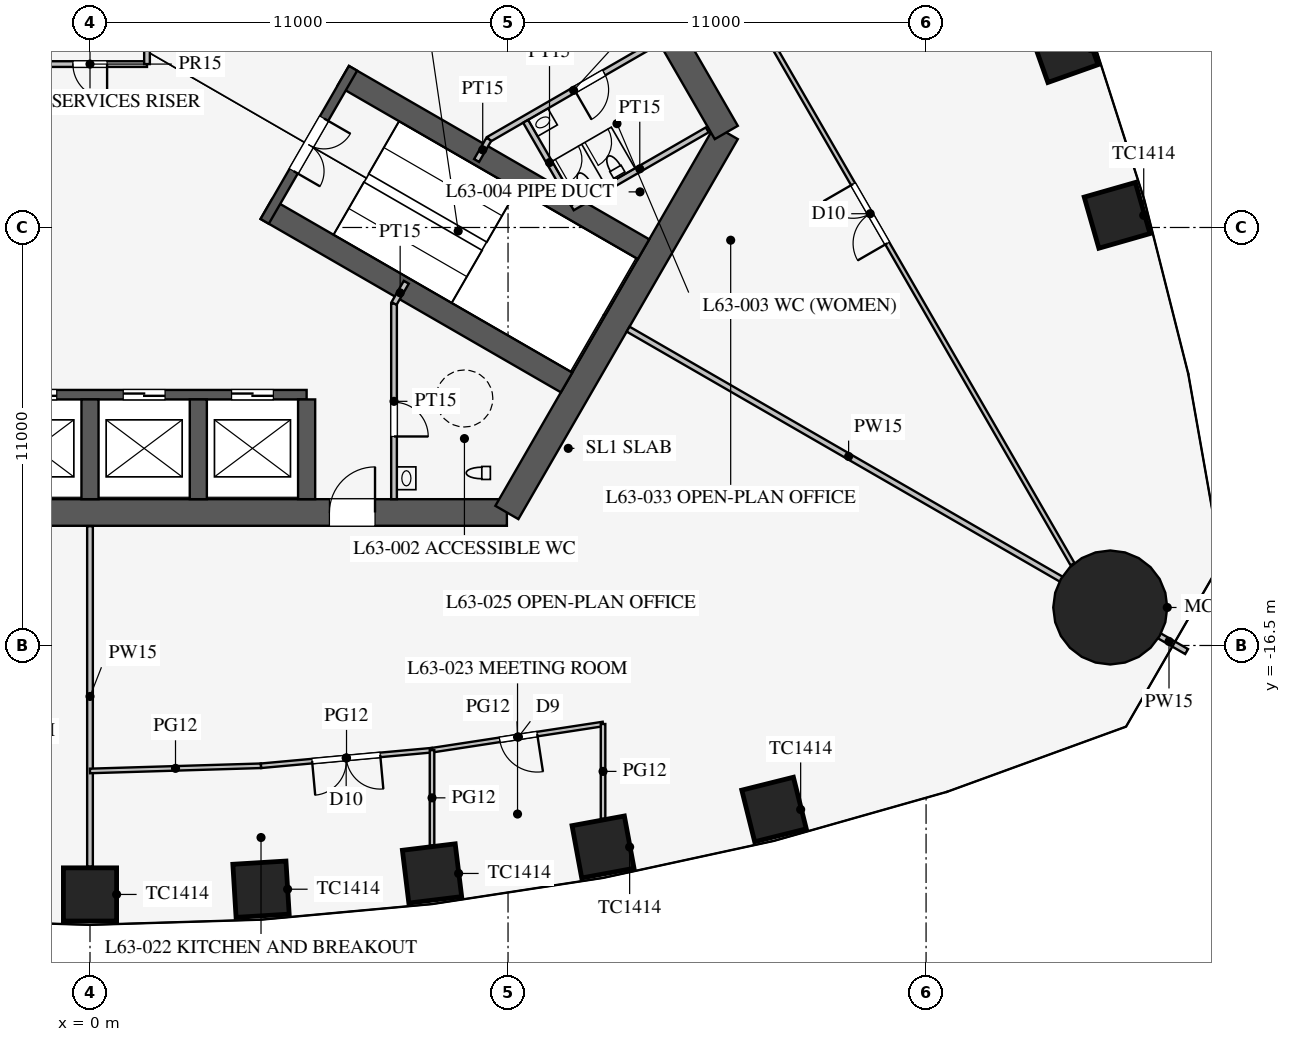
"""IFC4 building model, lengths in metres.
Left out: names, types, materials, properties, quantities, classifications, styles, units other than length and angle.
Written with IfcOpenShell. Run it as: python <this file> out.ifc"""

import sys

from ifc_helpers import new_model, si_unit, direction, frame, frame_2d, origin, origin_2d, place, context, subcontext, project, spatial, rectangle, circle, extrude, element, fill, save


model = new_model("IFC4")
c1 = context("Model", 3, precision=1e-05, world=origin(), true_north=direction((0.0, 1.0)))
c2 = subcontext(c1, "Body", "Model", "MODEL_VIEW")
j1 = project(units=[si_unit("LENGTHUNIT", "METRE"), si_unit("PLANEANGLEUNIT", "RADIAN")], contexts=[c1])
p1 = place(None, origin())
s1 = spatial("IfcSite", under=j1, at=p1, CompositionType="ELEMENT")
p2 = place(p1, origin())
s2 = spatial("IfcBuilding", under=s1, at=p2, CompositionType="ELEMENT")
p3 = place(p2, frame((0.0, 0.0, 276.3)))
s3 = spatial("IfcBuildingStorey", under=s2, at=p3, CompositionType="ELEMENT", Elevation=276.3)
for number, where, z_axis, x_axis in (
    (1, (0.0, -23.052, 0.0), (0.0, 0.0, 1.0), (1.0, 0.0, 0.0)),
    (2, (4.5, -22.914, 0.0), (0.0, 0.0, 1.0), (0.998, 0.061, 0.0)),
    (3, (9.0, -22.499, 0.0), (0.0, 0.0, 1.0), (0.993, 0.121, 0.0)),
    (4, (13.5, -21.803, 0.0), (0.0, 0.0, 1.0), (0.983, 0.182, 0.0)),
    (5, (18.0, -20.816, 0.0), (0.0, 0.0, 1.0), (0.97, 0.242, 0.0)),
    (6, (27.027, -5.18, 0.0), (0.0, 0.0, 1.0), (-0.275, 0.961, 0.0)),
    (7, (25.632, -0.79, 0.0), (0.0, 0.0, 1.0), (-0.334, 0.942, 0.0)),
):
    element("IfcColumn", number, at=place(p3, frame(where, z_axis=z_axis, x_axis=x_axis)), inside=s3, PredefinedType="COLUMN", context=c2, shape_type="SweptSolid", body=[
        extrude(rectangle(XDim=1.4, YDim=1.4, at=origin_2d()), origin(), (0.0, 0.0, 1.0), 4.2),
    ])
p4 = place(p3, frame((26.847, -15.5, 0.0), z_axis=(0.0, 0.0, 1.0), x_axis=(1.0, 0.0, 0.0)))
e8 = element("IfcColumn", 8, at=p4, inside=s3, PredefinedType="COLUMN", context=c2, shape_type="SweptSolid", body=[
    extrude(circle(Radius=1.5, at=origin_2d()), origin(), (0.0, 0.0, 1.0), 4.2),
])
p5 = place(p3, frame((-10.97, -13.0, 0.0), z_axis=(0.0, 0.0, 1.0), x_axis=(1.0, 0.0, 0.0)))
e9 = element("IfcWall", 9, at=p5, inside=s3, PredefinedType="SHEAR", context=c2, shape_type="SweptSolid", body=[
    extrude(rectangle(XDim=21.939, YDim=0.7, at=frame_2d((10.97, 0.0))), origin(), (0.0, 0.0, 1.0), 4.2),
])
p6 = place(p5, frame((17.27, 0.0, 0.0)))
e10 = element("IfcOpeningElement", 10, at=p6, cuts=e9, PredefinedType="OPENING", context=c2, shape_type="SweptSolid", body=[
    extrude(rectangle(XDim=1.2, YDim=2.1, at=frame_2d((0.6, 1.05))), frame((0.0, 0.36, 0.0), z_axis=(0.0, -1.0, 0.0), x_axis=(1.0, 0.0, 0.0)), (0.0, 0.0, 1.0), 0.72),
])
p7 = place(p5, frame((3.47, 0.0, 0.0)))
e11 = element("IfcOpeningElement", 11, at=p7, cuts=e9, PredefinedType="OPENING", context=c2, shape_type="SweptSolid", body=[
    extrude(rectangle(XDim=1.2, YDim=2.1, at=frame_2d((0.6, 1.05))), frame((0.0, 0.36, 0.0), z_axis=(0.0, -1.0, 0.0), x_axis=(1.0, 0.0, 0.0)), (0.0, 0.0, 1.0), 0.72),
])
p8 = place(p3, frame((10.97, -13.0, 0.0), z_axis=(0.0, 0.0, 1.0), x_axis=(0.499995765644, 0.866027848477, 0.0)))
e12 = element("IfcWall", 12, at=p8, inside=s3, PredefinedType="SHEAR", context=c2, shape_type="SweptSolid", body=[
    extrude(rectangle(XDim=11.547, YDim=0.7, at=frame_2d((5.773, 0.0))), origin(), (0.0, 0.0, 1.0), 4.2),
])
p9 = place(p3, frame((16.743, -3.0, 0.0), z_axis=(0.0, 0.0, 1.0), x_axis=(-0.500002442456, 0.866023993627, 0.0)))
e13 = element("IfcWall", 13, at=p9, inside=s3, PredefinedType="SHEAR", context=c2, shape_type="SweptSolid", body=[
    extrude(rectangle(XDim=21.939, YDim=0.7, at=frame_2d((10.97, 0.0))), origin(), (0.0, 0.0, 1.0), 4.2),
])
p10 = place(p9, frame((17.27, 0.0, 0.0)))
e14 = element("IfcOpeningElement", 14, at=p10, cuts=e13, PredefinedType="OPENING", context=c2, shape_type="SweptSolid", body=[
    extrude(rectangle(XDim=1.2, YDim=2.1, at=frame_2d((0.6, 1.05))), frame((0.0, 0.36, 0.0), z_axis=(0.0, -1.0, 0.0), x_axis=(1.0, 0.0, 0.0)), (0.0, 0.0, 1.0), 0.72),
])
p11 = place(p9, frame((3.47, 0.0, 0.0)))
e15 = element("IfcOpeningElement", 15, at=p11, cuts=e13, PredefinedType="OPENING", context=c2, shape_type="SweptSolid", body=[
    extrude(rectangle(XDim=1.2, YDim=2.1, at=frame_2d((0.6, 1.05))), frame((0.0, 0.36, 0.0), z_axis=(0.0, -1.0, 0.0), x_axis=(1.0, 0.0, 0.0)), (0.0, 0.0, 1.0), 0.72),
])
p12 = place(p3, frame((-5.7, -9.9, 0.0), z_axis=(0.0, 0.0, 1.0), x_axis=(1.0, 0.0, 0.0)))
e16 = element("IfcWall", 16, at=p12, inside=s3, PredefinedType="SHEAR", context=c2, shape_type="SweptSolid", body=[
    extrude(rectangle(XDim=11.4, YDim=0.25, at=frame_2d((5.7, 0.0))), origin(), (0.0, 0.0, 1.0), 4.2),
])
p13 = place(p12, frame((0.875, 0.0, 0.0)))
e17 = element("IfcOpeningElement", 17, at=p13, cuts=e16, PredefinedType="OPENING", context=c2, shape_type="SweptSolid", body=[
    extrude(rectangle(XDim=1.1, YDim=2.2, at=frame_2d((0.55, 1.1))), frame((0.0, 0.135, 0.0), z_axis=(0.0, -1.0, 0.0), x_axis=(1.0, 0.0, 0.0)), (0.0, 0.0, 1.0), 0.27),
])
p14 = place(p12, frame((3.725, 0.0, 0.0)))
e18 = element("IfcOpeningElement", 18, at=p14, cuts=e16, PredefinedType="OPENING", context=c2, shape_type="SweptSolid", body=[
    extrude(rectangle(XDim=1.1, YDim=2.2, at=frame_2d((0.55, 1.1))), frame((0.0, 0.135, 0.0), z_axis=(0.0, -1.0, 0.0), x_axis=(1.0, 0.0, 0.0)), (0.0, 0.0, 1.0), 0.27),
])
p15 = place(p12, frame((6.575, 0.0, 0.0)))
e19 = element("IfcOpeningElement", 19, at=p15, cuts=e16, PredefinedType="OPENING", context=c2, shape_type="SweptSolid", body=[
    extrude(rectangle(XDim=1.1, YDim=2.2, at=frame_2d((0.55, 1.1))), frame((0.0, 0.135, 0.0), z_axis=(0.0, -1.0, 0.0), x_axis=(1.0, 0.0, 0.0)), (0.0, 0.0, 1.0), 0.27),
])
p16 = place(p12, frame((9.425, 0.0, 0.0)))
e20 = element("IfcOpeningElement", 20, at=p16, cuts=e16, PredefinedType="OPENING", context=c2, shape_type="SweptSolid", body=[
    extrude(rectangle(XDim=1.1, YDim=2.2, at=frame_2d((0.55, 1.1))), frame((0.0, 0.135, 0.0), z_axis=(0.0, -1.0, 0.0), x_axis=(1.0, 0.0, 0.0)), (0.0, 0.0, 1.0), 0.27),
])
for number, where, z_axis, x_axis in (
    (21, (0.0, -10.025, 0.0), (0.0, 0.0, 1.0), (0.0, -1.0, 0.0)),
    (22, (2.85, -10.025, 0.0), (0.0, 0.0, 1.0), (0.0, -1.0, 0.0)),
    (23, (5.7, -10.025, 0.0), (0.0, 0.0, 1.0), (0.0, -1.0, 0.0)),
):
    element("IfcWall", number, at=place(p3, frame(where, z_axis=z_axis, x_axis=x_axis)), inside=s3, PredefinedType="SHEAR", context=c2, shape_type="SweptSolid", body=[
        extrude(rectangle(XDim=2.625, YDim=0.45, at=frame_2d((1.312, 0.0))), origin(), (0.0, 0.0, 1.0), 4.2),
    ])
for number, where, z_axis, x_axis in (
    (24, (4.638, -5.016, 0.0), (0.0, 0.0, 1.0), (0.866, -0.5, 0.0)),
    (25, (6.663, -1.509, 0.0), (0.0, 0.0, 1.0), (0.866, -0.5, 0.0)),
):
    element("IfcWall", number, at=place(p3, frame(where, z_axis=z_axis, x_axis=x_axis)), inside=s3, PredefinedType="SHEAR", context=c2, shape_type="SweptSolid", body=[
        extrude(rectangle(XDim=9.125, YDim=0.6, at=frame_2d((4.562, 0.0))), origin(), (0.0, 0.0, 1.0), 4.2),
    ])
p17 = place(p3, frame((4.597, -5.339, 0.0), z_axis=(0.0, 0.0, 1.0), x_axis=(0.499984536904, 0.866034331223, 0.0)))
e26 = element("IfcWall", 26, at=p17, inside=s3, PredefinedType="SHEAR", context=c2, shape_type="SweptSolid", body=[
    extrude(rectangle(XDim=4.65, YDim=0.25, at=frame_2d((2.325, 0.0))), origin(), (0.0, 0.0, 1.0), 4.2),
])
p18 = place(p17, frame((1.525, 0.0, 0.0)))
e27 = element("IfcOpeningElement", 27, at=p18, cuts=e26, PredefinedType="OPENING", context=c2, shape_type="SweptSolid", body=[
    extrude(rectangle(XDim=1.6, YDim=2.1, at=frame_2d((0.8, 1.05))), frame((0.0, 0.135, 0.0), z_axis=(0.0, -1.0, 0.0), x_axis=(1.0, 0.0, 0.0)), (0.0, 0.0, 1.0), 0.27),
])
p19 = place(p3, frame((8.0, -7.5, 0.0), z_axis=(0.0, 0.0, 1.0), x_axis=(0.0, -1.0, 0.0)))
e28 = element("IfcWall", 28, at=p19, inside=s3, PredefinedType="PARTITIONING", context=c2, shape_type="SweptSolid", body=[
    extrude(rectangle(XDim=5.15, YDim=0.15, at=frame_2d((2.575, 0.0))), origin(), (0.0, 0.0, 1.0), 4.0),
])
p20 = place(p19, frame((2.6, 0.0, 0.0)))
e29 = element("IfcOpeningElement", 29, at=p20, cuts=e28, PredefinedType="OPENING", context=c2, shape_type="SweptSolid", body=[
    extrude(rectangle(XDim=0.9, YDim=2.1, at=frame_2d((0.45, 1.05))), frame((0.0, 0.085, 0.0), z_axis=(0.0, -1.0, 0.0), x_axis=(1.0, 0.0, 0.0)), (0.0, 0.0, 1.0), 0.17),
])
p21 = place(p3, frame((10.495, -3.178, 0.0), z_axis=(0.0, 0.0, 1.0), x_axis=(0.866037967349, 0.499978238636, 0.0)))
e30 = element("IfcWall", 30, at=p21, inside=s3, PredefinedType="PARTITIONING", context=c2, shape_type="SweptSolid", body=[
    extrude(rectangle(XDim=5.15, YDim=0.15, at=frame_2d((2.575, 0.0))), origin(), (0.0, 0.0, 1.0), 4.0),
])
p22 = place(p21, frame((2.6, 0.0, 0.0)))
e31 = element("IfcOpeningElement", 31, at=p22, cuts=e30, PredefinedType="OPENING", context=c2, shape_type="SweptSolid", body=[
    extrude(rectangle(XDim=0.9, YDim=2.1, at=frame_2d((0.45, 1.05))), frame((0.0, 0.085, 0.0), z_axis=(0.0, -1.0, 0.0), x_axis=(1.0, 0.0, 0.0)), (0.0, 0.0, 1.0), 0.17),
])
for number, where, z_axis, x_axis in (
    (32, (8.0, -7.5, 0.0), (0.0, 0.0, 1.0), (0.5, 0.866, 0.0)),
    (33, (10.495, -3.178, 0.0), (0.0, 0.0, 1.0), (-0.5, -0.866, 0.0)),
):
    element("IfcWall", number, at=place(p3, frame(where, z_axis=z_axis, x_axis=x_axis)), inside=s3, PredefinedType="PARTITIONING", context=c2, shape_type="SweptSolid", body=[
        extrude(rectangle(XDim=0.645, YDim=0.15, at=frame_2d((0.323, 0.0))), origin(), (0.0, 0.0, 1.0), 4.0),
    ])
p23 = place(p3, frame((12.691, -4.982, 0.0), z_axis=(0.0, 0.0, 1.0), x_axis=(0.8660249478, 0.500000789788, 0.0)))
e34 = element("IfcWall", 34, at=p23, inside=s3, PredefinedType="PARTITIONING", context=c2, shape_type="SweptSolid", body=[
    extrude(rectangle(XDim=4.1, YDim=0.15, at=frame_2d((2.05, 0.0))), origin(), (0.0, 0.0, 1.0), 4.0),
])
p24 = place(p3, frame((11.464, -2.706, 0.0), z_axis=(0.0, 0.0, 1.0), x_axis=(0.50001992892, -0.866013897511, 0.0)))
e35 = element("IfcWall", 35, at=p24, inside=s3, PredefinedType="PARTITIONING", context=c2, shape_type="SweptSolid", body=[
    extrude(rectangle(XDim=2.51, YDim=0.15, at=frame_2d((1.255, 0.0))), origin(), (0.0, 0.0, 1.0), 4.0),
])
p25 = place(p3, frame((-1.5, -1.2, 0.0), z_axis=(0.0, 0.0, 1.0), x_axis=(1.0, 0.0, 0.0)))
e36 = element("IfcWall", 36, at=p25, inside=s3, PredefinedType="PARTITIONING", context=c2, shape_type="SweptSolid", body=[
    extrude(rectangle(XDim=3.0, YDim=0.15, at=frame_2d((1.5, 0.0))), origin(), (0.0, 0.0, 1.0), 4.0),
])
p26 = place(p25, frame((1.05, 0.0, 0.0)))
e37 = element("IfcOpeningElement", 37, at=p26, cuts=e36, PredefinedType="OPENING", context=c2, shape_type="SweptSolid", body=[
    extrude(rectangle(XDim=0.9, YDim=2.1, at=frame_2d((0.45, 1.05))), frame((0.0, 0.085, 0.0), z_axis=(0.0, -1.0, 0.0), x_axis=(1.0, 0.0, 0.0)), (0.0, 0.0, 1.0), 0.17),
])
p27 = place(p3, frame((1.5, -1.2, 0.0), z_axis=(0.0, 0.0, 1.0), x_axis=(0.0, 1.0, 0.0)))
e38 = element("IfcWall", 38, at=p27, inside=s3, PredefinedType="PARTITIONING", context=c2, shape_type="SweptSolid", body=[
    extrude(rectangle(XDim=2.4, YDim=0.15, at=frame_2d((1.2, 0.0))), origin(), (0.0, 0.0, 1.0), 4.0),
])
p28 = place(p3, frame((14.159, -8.175, 0.0), z_axis=(0.0, 0.0, 1.0), x_axis=(0.866026905467, -0.499997399001, 0.0)))
e39 = element("IfcWall", 39, at=p28, inside=s3, PredefinedType="PARTITIONING", context=c2, shape_type="SweptSolid", body=[
    extrude(rectangle(XDim=13.4, YDim=0.15, at=frame_2d((6.7, 0.0))), origin(), (0.0, 0.0, 1.0), 2.5),
])
p29 = place(p3, frame((27.929, -16.125, 0.0), z_axis=(0.0, 0.0, 1.0), x_axis=(0.866086810508, -0.499893625349, 0.0)))
e40 = element("IfcWall", 40, at=p29, inside=s3, PredefinedType="PARTITIONING", context=c2, shape_type="SweptSolid", body=[
    extrude(rectangle(XDim=1.07, YDim=0.15, at=frame_2d((0.535, 0.0))), origin(), (0.0, 0.0, 1.0), 2.5),
])
p30 = place(p3, frame((0.0, -13.36, 0.0), z_axis=(0.0, 0.0, 1.0), x_axis=(0.0, -1.0, 0.0)))
e41 = element("IfcWall", 41, at=p30, inside=s3, PredefinedType="PARTITIONING", context=c2, shape_type="SweptSolid", body=[
    extrude(rectangle(XDim=8.961, YDim=0.15, at=frame_2d((4.481, 0.0))), origin(), (0.0, 0.0, 1.0), 2.6),
])
p31 = place(p3, frame((0.0, -19.802, 0.0), z_axis=(0.0, 0.0, 1.0), x_axis=(0.999542074227, 0.030259574513, 0.0)))
e42 = element("IfcWall", 42, at=p31, inside=s3, PredefinedType="PARTITIONING", context=c2, shape_type="SweptSolid", body=[
    extrude(rectangle(XDim=4.502, YDim=0.12, at=frame_2d((2.251, 0.0))), origin(), (0.0, 0.0, 1.0), 2.9),
])
p32 = place(p3, frame((4.5, -19.665, 0.0), z_axis=(0.0, 0.0, 1.0), x_axis=(0.995871921504, 0.090769576179, 0.0)))
e43 = element("IfcWall", 43, at=p32, inside=s3, PredefinedType="PARTITIONING", context=c2, shape_type="SweptSolid", body=[
    extrude(rectangle(XDim=4.519, YDim=0.12, at=frame_2d((2.259, 0.0))), origin(), (0.0, 0.0, 1.0), 2.9),
])
p33 = place(p32, frame((1.35, 0.0, 0.15)))
e44 = element("IfcOpeningElement", 44, at=p33, cuts=e43, PredefinedType="OPENING", context=c2, shape_type="SweptSolid", body=[
    extrude(rectangle(XDim=1.8, YDim=2.1, at=frame_2d((0.9, 1.05))), frame((0.0, 0.07, 0.0), z_axis=(0.0, -1.0, 0.0), x_axis=(1.0, 0.0, 0.0)), (0.0, 0.0, 1.0), 0.14),
])
p34 = place(p3, frame((9.0, -19.255, 0.0), z_axis=(0.0, 0.0, 1.0), x_axis=(0.988481794406, 0.151339823341, 0.0)))
e45 = element("IfcWall", 45, at=p34, inside=s3, PredefinedType="PARTITIONING", context=c2, shape_type="SweptSolid", body=[
    extrude(rectangle(XDim=4.552, YDim=0.12, at=frame_2d((2.276, 0.0))), origin(), (0.0, 0.0, 1.0), 2.9),
])
p35 = place(p34, frame((1.8, 0.0, 0.15)))
e46 = element("IfcOpeningElement", 46, at=p35, cuts=e45, PredefinedType="OPENING", context=c2, shape_type="SweptSolid", body=[
    extrude(rectangle(XDim=1.0, YDim=2.1, at=frame_2d((0.5, 1.05))), frame((0.0, 0.07, 0.0), z_axis=(0.0, -1.0, 0.0), x_axis=(1.0, 0.0, 0.0)), (0.0, 0.0, 1.0), 0.14),
])
p36 = place(p3, frame((13.5, -18.566, 0.0), z_axis=(0.0, 0.0, 1.0), x_axis=(0.0, -1.0, 0.0)))
e47 = element("IfcWall", 47, at=p36, inside=s3, PredefinedType="PARTITIONING", context=c2, shape_type="SweptSolid", body=[
    extrude(rectangle(XDim=2.494, YDim=0.12, at=frame_2d((1.247, 0.0))), origin(), (0.0, 0.0, 1.0), 2.4),
])
p37 = place(p3, frame((9.0, -19.255, 0.0), z_axis=(0.0, 0.0, 1.0), x_axis=(0.0, -1.0, 0.0)))
e48 = element("IfcWall", 48, at=p37, inside=s3, PredefinedType="PARTITIONING", context=c2, shape_type="SweptSolid", body=[
    extrude(rectangle(XDim=2.509, YDim=0.12, at=frame_2d((1.254, 0.0))), origin(), (0.0, 0.0, 1.0), 2.6),
])
p38 = place(p3, frame((25.854, -14.361, 0.0), z_axis=(0.0, 0.0, 1.0), x_axis=(-0.499999496503, 0.866025694478, 0.0)))
e49 = element("IfcWall", 49, at=p38, inside=s3, PredefinedType="PARTITIONING", context=c2, shape_type="SweptSolid", body=[
    extrude(rectangle(XDim=50.728, YDim=0.12, at=frame_2d((25.364, 0.0))), origin(), (0.0, 0.0, 1.0), 2.9),
])
p39 = place(p38, frame((9.75, 0.0, 0.15)))
e50 = element("IfcOpeningElement", 50, at=p39, cuts=e49, PredefinedType="OPENING", context=c2, shape_type="SweptSolid", body=[
    extrude(rectangle(XDim=1.8, YDim=2.1, at=frame_2d((0.9, 1.05))), frame((0.0, 0.07, 0.0), z_axis=(0.0, -1.0, 0.0), x_axis=(1.0, 0.0, 0.0)), (0.0, 0.0, 1.0), 0.14),
])
p40 = place(p38, frame((39.2, 0.0, 0.15)))
e51 = element("IfcOpeningElement", 51, at=p40, cuts=e49, PredefinedType="OPENING", context=c2, shape_type="SweptSolid", body=[
    extrude(rectangle(XDim=1.8, YDim=2.1, at=frame_2d((0.9, 1.05))), frame((0.0, 0.07, 0.0), z_axis=(0.0, -1.0, 0.0), x_axis=(1.0, 0.0, 0.0)), (0.0, 0.0, 1.0), 0.14),
])
p41 = place(p20, origin())
e52 = element("IfcDoor", 52, at=p41, inside=s3, OperationType="SINGLE_SWING_RIGHT", PredefinedType="DOOR", context=c2, shape_type="SweptSolid", body=[
    extrude(rectangle(XDim=0.9, YDim=2.1, at=frame_2d((0.45, 1.05))), frame((0.0, 0.025, 0.0), z_axis=(0.0, -1.0, 0.0), x_axis=(1.0, 0.0, 0.0)), (0.0, 0.0, 1.0), 0.05),
])
fill(e29, e52)
p42 = place(p22, frame((0.9, 0.0, 0.0), z_axis=(0.0, 0.0, 1.0), x_axis=(-1.0, 0.0, 0.0)))
e53 = element("IfcDoor", 53, at=p42, inside=s3, OperationType="SINGLE_SWING_RIGHT", PredefinedType="DOOR", context=c2, shape_type="SweptSolid", body=[
    extrude(rectangle(XDim=0.9, YDim=2.1, at=frame_2d((0.45, 1.05))), frame((0.0, 0.025, 0.0), z_axis=(0.0, -1.0, 0.0), x_axis=(1.0, 0.0, 0.0)), (0.0, 0.0, 1.0), 0.05),
])
fill(e31, e53)
p43 = place(p26, frame((0.9, 0.0, 0.0), z_axis=(0.0, 0.0, 1.0), x_axis=(-1.0, 0.0, 0.0)))
e54 = element("IfcDoor", 54, at=p43, inside=s3, OperationType="SINGLE_SWING_LEFT", PredefinedType="DOOR", context=c2, shape_type="SweptSolid", body=[
    extrude(rectangle(XDim=0.9, YDim=2.1, at=frame_2d((0.45, 1.05))), frame((0.0, 0.025, 0.0), z_axis=(0.0, -1.0, 0.0), x_axis=(1.0, 0.0, 0.0)), (0.0, 0.0, 1.0), 0.05),
])
fill(e37, e54)
p44 = place(p18, frame((1.6, 0.0, 0.0), z_axis=(0.0, 0.0, 1.0), x_axis=(-1.0, 0.0, 0.0)))
e55 = element("IfcDoor", 55, at=p44, inside=s3, OperationType="DOUBLE_DOOR_SINGLE_SWING", PredefinedType="DOOR", context=c2, shape_type="SweptSolid", body=[
    extrude(rectangle(XDim=1.6, YDim=2.1, at=frame_2d((0.8, 1.05))), frame((0.0, 0.025, 0.0), z_axis=(0.0, -1.0, 0.0), x_axis=(1.0, 0.0, 0.0)), (0.0, 0.0, 1.0), 0.05),
])
fill(e27, e55)
p45 = place(p6, origin())
e56 = element("IfcDoor", 56, at=p45, inside=s3, OperationType="SINGLE_SWING_RIGHT", PredefinedType="DOOR", context=c2, shape_type="SweptSolid", body=[
    extrude(rectangle(XDim=1.2, YDim=2.1, at=frame_2d((0.6, 1.05))), frame((0.0, 0.025, 0.0), z_axis=(0.0, -1.0, 0.0), x_axis=(1.0, 0.0, 0.0)), (0.0, 0.0, 1.0), 0.05),
])
fill(e10, e56)
p46 = place(p33, frame((1.8, 0.0, 0.0), z_axis=(0.0, 0.0, 1.0), x_axis=(-1.0, 0.0, 0.0)))
e57 = element("IfcDoor", 57, at=p46, inside=s3, OperationType="DOUBLE_DOOR_SINGLE_SWING", PredefinedType="DOOR", context=c2, shape_type="SweptSolid", body=[
    extrude(rectangle(XDim=1.8, YDim=2.1, at=frame_2d((0.9, 1.05))), frame((0.0, 0.025, 0.0), z_axis=(0.0, -1.0, 0.0), x_axis=(1.0, 0.0, 0.0)), (0.0, 0.0, 1.0), 0.05),
])
fill(e44, e57)
p47 = place(p35, frame((1.0, 0.0, 0.0), z_axis=(0.0, 0.0, 1.0), x_axis=(-1.0, 0.0, 0.0)))
e58 = element("IfcDoor", 58, at=p47, inside=s3, OperationType="SINGLE_SWING_LEFT", PredefinedType="DOOR", context=c2, shape_type="SweptSolid", body=[
    extrude(rectangle(XDim=1.0, YDim=2.1, at=frame_2d((0.5, 1.05))), frame((0.0, 0.025, 0.0), z_axis=(0.0, -1.0, 0.0), x_axis=(1.0, 0.0, 0.0)), (0.0, 0.0, 1.0), 0.05),
])
fill(e46, e58)
p48 = place(p39, origin())
e59 = element("IfcDoor", 59, at=p48, inside=s3, OperationType="DOUBLE_DOOR_SINGLE_SWING", PredefinedType="DOOR", context=c2, shape_type="SweptSolid", body=[
    extrude(rectangle(XDim=1.8, YDim=2.1, at=frame_2d((0.9, 1.05))), frame((0.0, 0.025, 0.0), z_axis=(0.0, -1.0, 0.0), x_axis=(1.0, 0.0, 0.0)), (0.0, 0.0, 1.0), 0.05),
])
fill(e50, e59)
p49 = place(p14, origin())
e60 = element("IfcDoor", 60, at=p49, inside=s3, OperationType="DOUBLE_DOOR_SLIDING", PredefinedType="DOOR", context=c2, shape_type="SweptSolid", body=[
    extrude(rectangle(XDim=1.1, YDim=2.2, at=frame_2d((0.55, 1.1))), frame((0.0, 0.025, 0.0), z_axis=(0.0, -1.0, 0.0), x_axis=(1.0, 0.0, 0.0)), (0.0, 0.0, 1.0), 0.05),
])
fill(e18, e60)
p50 = place(p15, origin())
e61 = element("IfcDoor", 61, at=p50, inside=s3, OperationType="DOUBLE_DOOR_SLIDING", PredefinedType="DOOR", context=c2, shape_type="SweptSolid", body=[
    extrude(rectangle(XDim=1.1, YDim=2.2, at=frame_2d((0.55, 1.1))), frame((0.0, 0.025, 0.0), z_axis=(0.0, -1.0, 0.0), x_axis=(1.0, 0.0, 0.0)), (0.0, 0.0, 1.0), 0.05),
])
fill(e19, e61)
p51 = place(p16, origin())
e62 = element("IfcDoor", 62, at=p51, inside=s3, OperationType="DOUBLE_DOOR_SLIDING", PredefinedType="DOOR", context=c2, shape_type="SweptSolid", body=[
    extrude(rectangle(XDim=1.1, YDim=2.2, at=frame_2d((0.55, 1.1))), frame((0.0, 0.025, 0.0), z_axis=(0.0, -1.0, 0.0), x_axis=(1.0, 0.0, 0.0)), (0.0, 0.0, 1.0), 0.05),
])
fill(e20, e62)
save(model, sys.argv[1])
